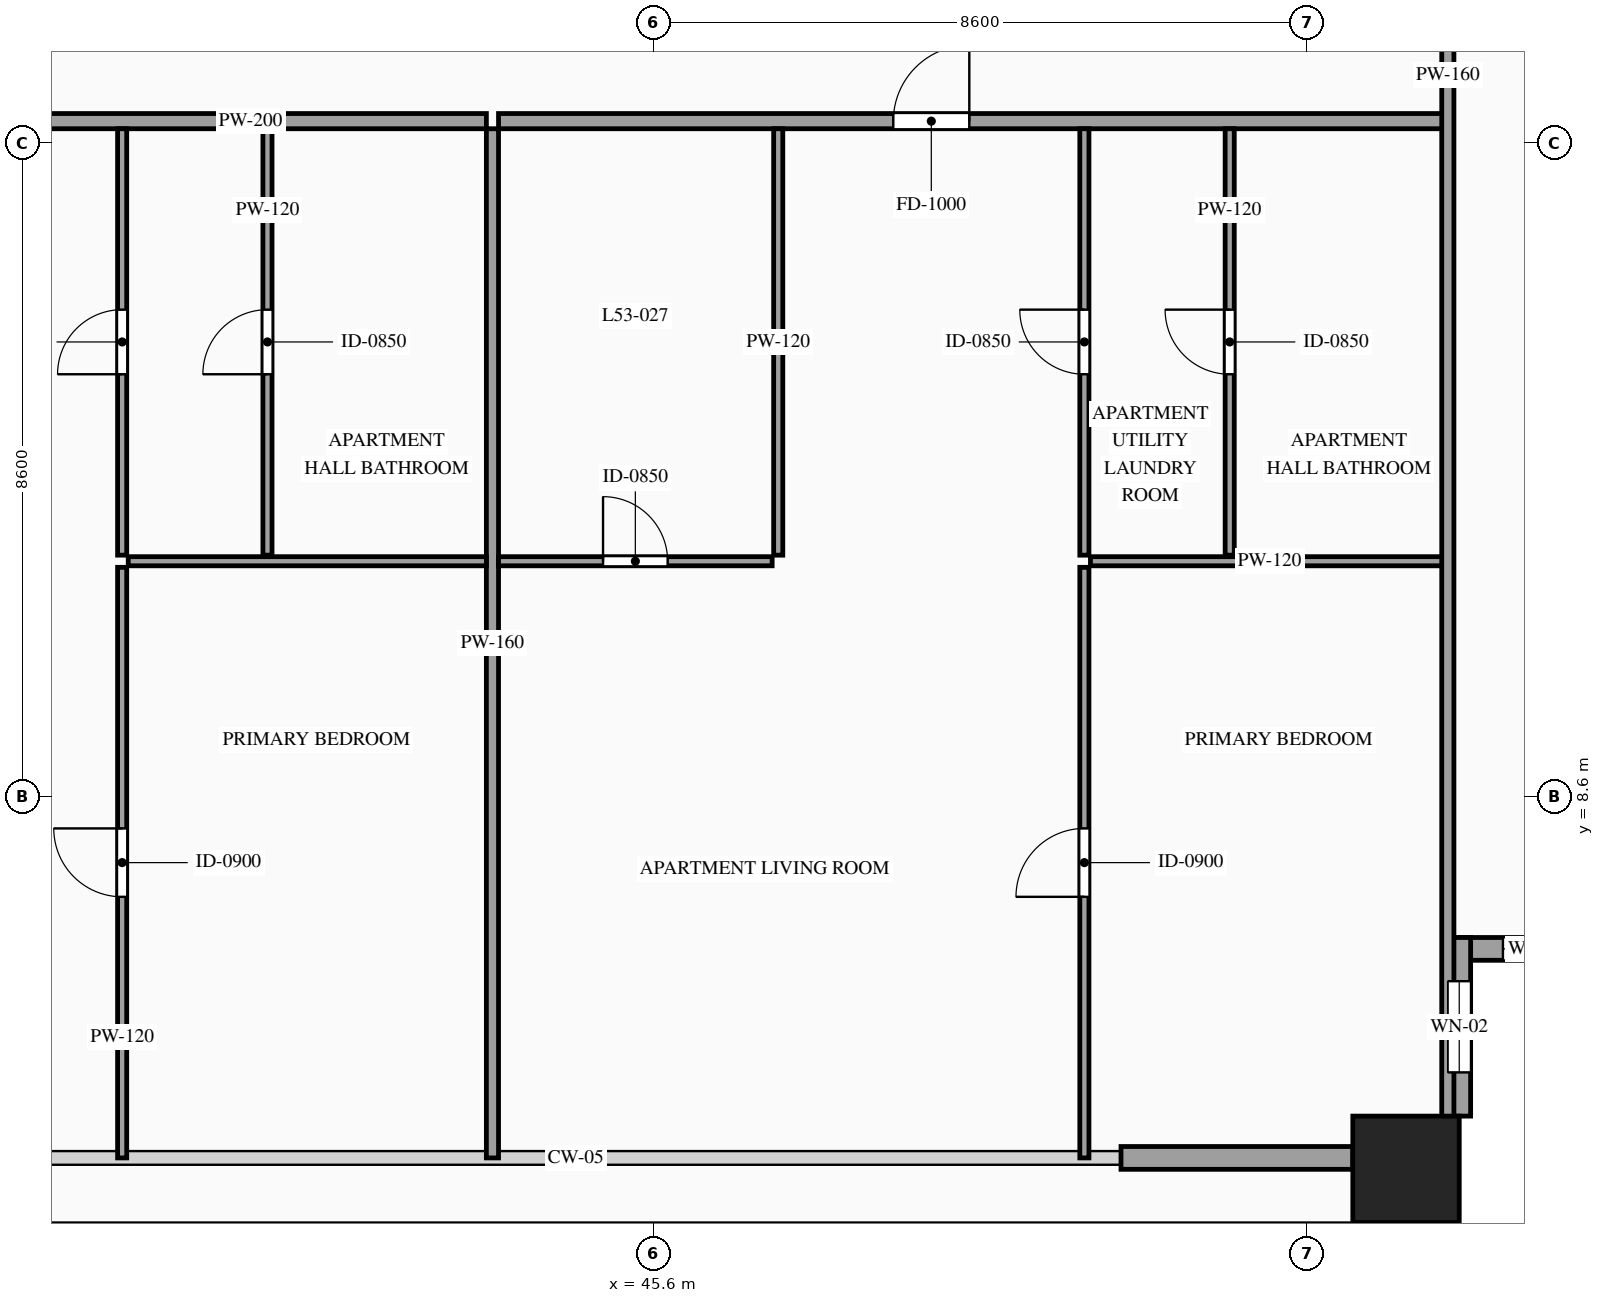
"""IFC4 building model, lengths in metres.
Left out: names, types, materials, properties, quantities, classifications, styles, units other than length and angle.
Written with IfcOpenShell. Run it as: python <this file> out.ifc"""

import sys

from ifc_helpers import new_model, si_unit, direction, frame, frame_2d, origin, origin_2d, place, context, subcontext, project, spatial, rectangle, hollow_rectangle, extrude, source, transform, mapped, element, fill, save


model = new_model("IFC4")
c1 = context("Model", 3, precision=1e-05, world=origin(), true_north=direction((0.0, 1.0)))
c2 = subcontext(c1, "Body", "Model", "MODEL_VIEW")
j1 = project(units=[si_unit("LENGTHUNIT", "METRE"), si_unit("PLANEANGLEUNIT", "RADIAN")], contexts=[c1])
p1 = place(None, origin())
s1 = spatial("IfcSite", under=j1, at=p1, CompositionType="ELEMENT")
p2 = place(p1, origin())
s2 = spatial("IfcBuilding", under=s1, at=p2, CompositionType="ELEMENT")
p3 = place(p2, frame((0.0, 0.0, 202.0)))
s3 = spatial("IfcBuildingStorey", under=s2, at=p3, CompositionType="ELEMENT", Elevation=202.0)
m1 = source(origin(), c2, "Body", "SweptSolid", [
    extrude(hollow_rectangle(XDim=1.4, YDim=1.4, WallThickness=0.06, at=origin_2d()), origin(), (0.0, 0.0, 1.0), 3.5),
])
p4 = place(p3, frame((55.5, 3.7, 0.0), z_axis=(0.0, 0.0, 1.0), x_axis=(1.0, 0.0, 0.0)))
e1 = element("IfcColumn", 1, at=p4, inside=s3, PredefinedType="COLUMN", context=c2, shape_type="MappedRepresentation", body=[
    mapped(m1, transform((0.0, 0.0, 0.0), scale=1.0)),
])
p5 = place(p3, frame((56.05, 6.6, 0.0), z_axis=(0.0, 0.0, 1.0), x_axis=(1.0, 0.0, 0.0)))
e2 = element("IfcWall", 2, at=p5, inside=s3, PredefinedType="SOLIDWALL", context=c2, shape_type="SweptSolid", body=[
    extrude(rectangle(XDim=2.35, YDim=0.3, at=frame_2d((1.175, 0.0))), origin(), (0.0, 0.0, 1.0), 3.28),
])
p6 = place(p5, frame((0.725, 0.0, 0.85)))
e3 = element("IfcOpeningElement", 3, at=p6, cuts=e2, PredefinedType="OPENING", context=c2, shape_type="SweptSolid", body=[
    extrude(rectangle(XDim=0.9, YDim=1.5, at=frame_2d((0.45, 0.75))), frame((0.0, 0.165, 0.0), z_axis=(0.0, -1.0, 0.0), x_axis=(1.0, 0.0, 0.0)), (0.0, 0.0, 1.0), 0.33),
])
p7 = place(p3, frame((56.2, 4.4, 0.0), z_axis=(0.0, 0.0, 1.0), x_axis=(0.0, 1.0, 0.0)))
e4 = element("IfcWall", 4, at=p7, inside=s3, PredefinedType="SOLIDWALL", context=c2, shape_type="SweptSolid", body=[
    extrude(rectangle(XDim=2.35, YDim=0.3, at=frame_2d((1.175, 0.0))), origin(), (0.0, 0.0, 1.0), 3.28),
])
p8 = place(p7, frame((0.575, 0.0, 0.85)))
e5 = element("IfcOpeningElement", 5, at=p8, cuts=e4, PredefinedType="OPENING", context=c2, shape_type="SweptSolid", body=[
    extrude(rectangle(XDim=1.2, YDim=2.1, at=frame_2d((0.6, 1.05))), frame((0.0, 0.165, 0.0), z_axis=(0.0, -1.0, 0.0), x_axis=(1.0, 0.0, 0.0)), (0.0, 0.0, 1.0), 0.33),
])
m2 = source(origin(), c2, "Body", "SweptSolid", [
    extrude(rectangle(XDim=3.05, YDim=0.3, at=frame_2d((1.525, 0.0))), origin(), (0.0, 0.0, 1.0), 2.835),
])
p9 = place(p3, frame((51.75, 3.85, 0.0), z_axis=(0.0, 0.0, 1.0), x_axis=(1.0, 0.0, 0.0)))
e6 = element("IfcWall", 6, at=p9, inside=s3, PredefinedType="SOLIDWALL", context=c2, shape_type="MappedRepresentation", body=[
    mapped(m2, transform((0.0, 0.0, 0.0), scale=1.0)),
])
p10 = place(p3, frame((30.6, 17.49, 0.0), z_axis=(0.0, 0.0, 1.0), x_axis=(1.0, 0.0, 0.0)))
e7 = element("IfcWall", 7, at=p10, inside=s3, PredefinedType="PARTITIONING", context=c2, shape_type="SweptSolid", body=[
    extrude(rectangle(XDim=12.8, YDim=0.2, at=frame_2d((6.4, 0.0))), origin(), (0.0, 0.0, 1.0), 3.28),
])
p11 = place(p10, frame((5.344, 0.0, 0.0)))
e8 = element("IfcOpeningElement", 8, at=p11, cuts=e7, PredefinedType="OPENING", context=c2, shape_type="SweptSolid", body=[
    extrude(rectangle(XDim=1.0, YDim=2.2, at=frame_2d((0.5, 1.1))), frame((0.0, 0.115, 0.0), z_axis=(0.0, -1.0, 0.0), x_axis=(1.0, 0.0, 0.0)), (0.0, 0.0, 1.0), 0.23),
])
m3 = source(origin(), c2, "Body", "SweptSolid", [
    extrude(rectangle(XDim=13.54, YDim=0.16, at=frame_2d((6.77, 0.0))), origin(), (0.0, 0.0, 1.0), 3.28),
])
p12 = place(p3, frame((43.48, 3.85, 0.0), z_axis=(0.0, 0.0, 1.0), x_axis=(0.0, 1.0, 0.0)))
e9 = element("IfcWall", 9, at=p12, inside=s3, PredefinedType="PARTITIONING", context=c2, shape_type="MappedRepresentation", body=[
    mapped(m3, transform((0.0, 0.0, 0.0), scale=1.0)),
])
p13 = place(p3, frame((40.52, 11.78, 0.0), z_axis=(0.0, 0.0, 1.0), x_axis=(0.0, 1.0, 0.0)))
e10 = element("IfcWall", 10, at=p13, inside=s3, PredefinedType="PARTITIONING", context=c2, shape_type="SweptSolid", body=[
    extrude(rectangle(XDim=5.61, YDim=0.12, at=frame_2d((2.805, 0.0))), origin(), (0.0, 0.0, 1.0), 3.28),
])
p14 = place(p13, frame((2.38, 0.0, 0.0)))
e11 = element("IfcOpeningElement", 11, at=p14, cuts=e10, PredefinedType="OPENING", context=c2, shape_type="SweptSolid", body=[
    extrude(rectangle(XDim=0.85, YDim=2.1, at=frame_2d((0.425, 1.05))), frame((0.0, 0.075, 0.0), z_axis=(0.0, -1.0, 0.0), x_axis=(1.0, 0.0, 0.0)), (0.0, 0.0, 1.0), 0.15),
])
m4 = source(origin(), c2, "Body", "SweptSolid", [
    extrude(rectangle(XDim=4.712, YDim=0.12, at=frame_2d((2.356, 0.0))), origin(), (0.0, 0.0, 1.0), 2.875),
])
p15 = place(p3, frame((38.688, 11.7, 0.0), z_axis=(0.0, 0.0, 1.0), x_axis=(1.0, 0.0, 0.0)))
e12 = element("IfcWall", 12, at=p15, inside=s3, PredefinedType="PARTITIONING", context=c2, shape_type="MappedRepresentation", body=[
    mapped(m4, transform((0.0, 0.0, 0.0), scale=1.0)),
])
p16 = place(p3, frame((38.608, 3.85, 0.0), z_axis=(0.0, 0.0, 1.0), x_axis=(0.0, 1.0, 0.0)))
e13 = element("IfcWall", 13, at=p16, inside=s3, PredefinedType="PARTITIONING", context=c2, shape_type="SweptSolid", body=[
    extrude(rectangle(XDim=7.77, YDim=0.12, at=frame_2d((3.885, 0.0))), origin(), (0.0, 0.0, 1.0), 3.28),
])
p17 = place(p16, frame((3.435, 0.0, 0.0)))
e14 = element("IfcOpeningElement", 14, at=p17, cuts=e13, PredefinedType="OPENING", context=c2, shape_type="SweptSolid", body=[
    extrude(rectangle(XDim=0.9, YDim=2.15, at=frame_2d((0.45, 1.075))), frame((0.0, 0.075, 0.0), z_axis=(0.0, -1.0, 0.0), x_axis=(1.0, 0.0, 0.0)), (0.0, 0.0, 1.0), 0.15),
])
p18 = place(p3, frame((38.608, 11.78, 0.0), z_axis=(0.0, 0.0, 1.0), x_axis=(0.0, 1.0, 0.0)))
e15 = element("IfcWall", 15, at=p18, inside=s3, PredefinedType="PARTITIONING", context=c2, shape_type="SweptSolid", body=[
    extrude(rectangle(XDim=5.61, YDim=0.12, at=frame_2d((2.805, 0.0))), origin(), (0.0, 0.0, 1.0), 3.28),
])
p19 = place(p18, frame((2.38, 0.0, 0.0)))
e16 = element("IfcOpeningElement", 16, at=p19, cuts=e15, PredefinedType="OPENING", context=c2, shape_type="SweptSolid", body=[
    extrude(rectangle(XDim=0.85, YDim=2.1, at=frame_2d((0.425, 1.05))), frame((0.0, 0.075, 0.0), z_axis=(0.0, -1.0, 0.0), x_axis=(1.0, 0.0, 0.0)), (0.0, 0.0, 1.0), 0.15),
])
p20 = place(p3, frame((43.56, 17.49, 0.0), z_axis=(0.0, 0.0, 1.0), x_axis=(1.0, 0.0, 0.0)))
e17 = element("IfcWall", 17, at=p20, inside=s3, PredefinedType="PARTITIONING", context=c2, shape_type="SweptSolid", body=[
    extrude(rectangle(XDim=12.5, YDim=0.2, at=frame_2d((6.25, 0.0))), origin(), (0.0, 0.0, 1.0), 3.28),
])
p21 = place(p20, frame((5.194, 0.0, 0.0)))
e18 = element("IfcOpeningElement", 18, at=p21, cuts=e17, PredefinedType="OPENING", context=c2, shape_type="SweptSolid", body=[
    extrude(rectangle(XDim=1.0, YDim=2.2, at=frame_2d((0.5, 1.1))), frame((0.0, 0.115, 0.0), z_axis=(0.0, -1.0, 0.0), x_axis=(1.0, 0.0, 0.0)), (0.0, 0.0, 1.0), 0.23),
])
p22 = place(p3, frame((43.56, 11.7, 0.0), z_axis=(0.0, 0.0, 1.0), x_axis=(1.0, 0.0, 0.0)))
e19 = element("IfcWall", 19, at=p22, inside=s3, PredefinedType="PARTITIONING", context=c2, shape_type="SweptSolid", body=[
    extrude(rectangle(XDim=3.6, YDim=0.12, at=frame_2d((1.8, 0.0))), origin(), (0.0, 0.0, 1.0), 2.875),
])
p23 = place(p22, frame((1.375, 0.0, 0.0)))
e20 = element("IfcOpeningElement", 20, at=p23, cuts=e19, PredefinedType="OPENING", context=c2, shape_type="SweptSolid", body=[
    extrude(rectangle(XDim=0.85, YDim=2.1, at=frame_2d((0.425, 1.05))), frame((0.0, 0.075, 0.0), z_axis=(0.0, -1.0, 0.0), x_axis=(1.0, 0.0, 0.0)), (0.0, 0.0, 1.0), 0.15),
])
m5 = source(origin(), c2, "Body", "SweptSolid", [
    extrude(rectangle(XDim=5.61, YDim=0.12, at=frame_2d((2.805, 0.0))), origin(), (0.0, 0.0, 1.0), 3.28),
])
p24 = place(p3, frame((47.24, 11.78, 0.0), z_axis=(0.0, 0.0, 1.0), x_axis=(0.0, 1.0, 0.0)))
e21 = element("IfcWall", 21, at=p24, inside=s3, PredefinedType="PARTITIONING", context=c2, shape_type="MappedRepresentation", body=[
    mapped(m5, transform((0.0, 0.0, 0.0), scale=1.0)),
])
p25 = place(p3, frame((53.18, 11.78, 0.0), z_axis=(0.0, 0.0, 1.0), x_axis=(0.0, 1.0, 0.0)))
e22 = element("IfcWall", 22, at=p25, inside=s3, PredefinedType="PARTITIONING", context=c2, shape_type="SweptSolid", body=[
    extrude(rectangle(XDim=5.61, YDim=0.12, at=frame_2d((2.805, 0.0))), origin(), (0.0, 0.0, 1.0), 3.28),
])
p26 = place(p25, frame((2.38, 0.0, 0.0)))
e23 = element("IfcOpeningElement", 23, at=p26, cuts=e22, PredefinedType="OPENING", context=c2, shape_type="SweptSolid", body=[
    extrude(rectangle(XDim=0.85, YDim=2.1, at=frame_2d((0.425, 1.05))), frame((0.0, 0.075, 0.0), z_axis=(0.0, -1.0, 0.0), x_axis=(1.0, 0.0, 0.0)), (0.0, 0.0, 1.0), 0.15),
])
m6 = source(origin(), c2, "Body", "SweptSolid", [
    extrude(rectangle(XDim=4.712, YDim=0.12, at=frame_2d((2.356, 0.0))), origin(), (0.0, 0.0, 1.0), 3.28),
])
p27 = place(p3, frame((51.348, 11.7, 0.0), z_axis=(0.0, 0.0, 1.0), x_axis=(1.0, 0.0, 0.0)))
e24 = element("IfcWall", 24, at=p27, inside=s3, PredefinedType="PARTITIONING", context=c2, shape_type="MappedRepresentation", body=[
    mapped(m6, transform((0.0, 0.0, 0.0), scale=1.0)),
])
p28 = place(p3, frame((51.268, 3.85, 0.0), z_axis=(0.0, 0.0, 1.0), x_axis=(0.0, 1.0, 0.0)))
e25 = element("IfcWall", 25, at=p28, inside=s3, PredefinedType="PARTITIONING", context=c2, shape_type="SweptSolid", body=[
    extrude(rectangle(XDim=7.77, YDim=0.12, at=frame_2d((3.885, 0.0))), origin(), (0.0, 0.0, 1.0), 3.28),
])
p29 = place(p28, frame((3.435, 0.0, 0.0)))
e26 = element("IfcOpeningElement", 26, at=p29, cuts=e25, PredefinedType="OPENING", context=c2, shape_type="SweptSolid", body=[
    extrude(rectangle(XDim=0.9, YDim=2.15, at=frame_2d((0.45, 1.075))), frame((0.0, 0.075, 0.0), z_axis=(0.0, -1.0, 0.0), x_axis=(1.0, 0.0, 0.0)), (0.0, 0.0, 1.0), 0.15),
])
p30 = place(p3, frame((51.268, 11.78, 0.0), z_axis=(0.0, 0.0, 1.0), x_axis=(0.0, 1.0, 0.0)))
e27 = element("IfcWall", 27, at=p30, inside=s3, PredefinedType="PARTITIONING", context=c2, shape_type="SweptSolid", body=[
    extrude(rectangle(XDim=5.61, YDim=0.12, at=frame_2d((2.805, 0.0))), origin(), (0.0, 0.0, 1.0), 3.28),
])
p31 = place(p30, frame((2.38, 0.0, 0.0)))
e28 = element("IfcOpeningElement", 28, at=p31, cuts=e27, PredefinedType="OPENING", context=c2, shape_type="SweptSolid", body=[
    extrude(rectangle(XDim=0.85, YDim=2.1, at=frame_2d((0.425, 1.05))), frame((0.0, 0.075, 0.0), z_axis=(0.0, -1.0, 0.0), x_axis=(1.0, 0.0, 0.0)), (0.0, 0.0, 1.0), 0.15),
])
m7 = source(origin(), c2, "Body", "SweptSolid", [
    extrude(rectangle(XDim=28.19, YDim=0.16, at=frame_2d((14.095, 0.0))), origin(), (0.0, 0.0, 1.0), 3.28),
])
p32 = place(p3, frame((56.05, 4.0, 0.0), z_axis=(0.0, 0.0, 1.0), x_axis=(0.0, 1.0, 0.0)))
e29 = element("IfcWall", 29, at=p32, inside=s3, PredefinedType="PARTITIONING", context=c2, shape_type="MappedRepresentation", body=[
    mapped(m7, transform((0.0, 0.0, 0.0), scale=1.0)),
])
m8 = source(origin(), c2, "Body", "SweptSolid", [
    extrude(rectangle(XDim=0.9, YDim=1.5, at=frame_2d((0.45, 0.75))), frame((0.0, 0.03, 0.0), z_axis=(0.0, -1.0, 0.0), x_axis=(1.0, 0.0, 0.0)), (0.0, 0.0, 1.0), 0.06),
])
p33 = place(p6, origin())
e30 = element("IfcWindow", 30, at=p33, inside=s3, PartitioningType="SINGLE_PANEL", PredefinedType="WINDOW", context=c2, shape_type="MappedRepresentation", body=[
    mapped(m8, transform((0.0, 0.0, 0.0), scale=1.0)),
])
fill(e3, e30)
m9 = source(origin(), c2, "Body", "SweptSolid", [
    extrude(rectangle(XDim=1.2, YDim=2.1, at=frame_2d((0.6, 1.05))), frame((0.0, 0.03, 0.0), z_axis=(0.0, -1.0, 0.0), x_axis=(1.0, 0.0, 0.0)), (0.0, 0.0, 1.0), 0.06),
])
p34 = place(p8, origin())
e31 = element("IfcWindow", 31, at=p34, inside=s3, PartitioningType="SINGLE_PANEL", PredefinedType="WINDOW", context=c2, shape_type="MappedRepresentation", body=[
    mapped(m9, transform((0.0, 0.0, 0.0), scale=1.0)),
])
fill(e5, e31)
m10 = source(origin(), c2, "Body", "SweptSolid", [
    extrude(rectangle(XDim=0.85, YDim=2.1, at=frame_2d((0.425, 1.05))), frame((0.0, 0.025, 0.0), z_axis=(0.0, -1.0, 0.0), x_axis=(1.0, 0.0, 0.0)), (0.0, 0.0, 1.0), 0.05),
])
p35 = place(p14, origin())
e32 = element("IfcDoor", 32, at=p35, inside=s3, OperationType="SINGLE_SWING_LEFT", PredefinedType="DOOR", context=c2, shape_type="MappedRepresentation", body=[
    mapped(m10, transform((0.0, 0.0, 0.0), scale=1.0)),
])
fill(e11, e32)
m11 = source(origin(), c2, "Body", "SweptSolid", [
    extrude(rectangle(XDim=0.9, YDim=2.15, at=frame_2d((0.45, 1.075))), frame((0.0, 0.025, 0.0), z_axis=(0.0, -1.0, 0.0), x_axis=(1.0, 0.0, 0.0)), (0.0, 0.0, 1.0), 0.05),
])
p36 = place(p17, origin())
e33 = element("IfcDoor", 33, at=p36, inside=s3, OperationType="SINGLE_SWING_RIGHT", PredefinedType="DOOR", context=c2, shape_type="MappedRepresentation", body=[
    mapped(m11, transform((0.0, 0.0, 0.0), scale=1.0)),
])
fill(e14, e33)
p37 = place(p19, origin())
e34 = element("IfcDoor", 34, at=p37, inside=s3, OperationType="SINGLE_SWING_LEFT", PredefinedType="DOOR", context=c2, shape_type="MappedRepresentation", body=[
    mapped(m10, transform((0.0, 0.0, 0.0), scale=1.0)),
])
fill(e16, e34)
m12 = source(origin(), c2, "Body", "SweptSolid", [
    extrude(rectangle(XDim=1.0, YDim=2.2, at=frame_2d((0.5, 1.1))), frame((0.0, 0.025, 0.0), z_axis=(0.0, -1.0, 0.0), x_axis=(1.0, 0.0, 0.0)), (0.0, 0.0, 1.0), 0.05),
])
p38 = place(p21, origin())
e35 = element("IfcDoor", 35, at=p38, inside=s3, OperationType="SINGLE_SWING_RIGHT", PredefinedType="DOOR", context=c2, shape_type="MappedRepresentation", body=[
    mapped(m12, transform((0.0, 0.0, 0.0), scale=1.0)),
])
fill(e18, e35)
p39 = place(p23, origin())
e36 = element("IfcDoor", 36, at=p39, inside=s3, OperationType="SINGLE_SWING_LEFT", PredefinedType="DOOR", context=c2, shape_type="MappedRepresentation", body=[
    mapped(m10, transform((0.0, 0.0, 0.0), scale=1.0)),
])
fill(e20, e36)
p40 = place(p26, origin())
e37 = element("IfcDoor", 37, at=p40, inside=s3, OperationType="SINGLE_SWING_RIGHT", PredefinedType="DOOR", context=c2, shape_type="MappedRepresentation", body=[
    mapped(m10, transform((0.0, 0.0, 0.0), scale=1.0)),
])
fill(e23, e37)
p41 = place(p29, origin())
e38 = element("IfcDoor", 38, at=p41, inside=s3, OperationType="SINGLE_SWING_LEFT", PredefinedType="DOOR", context=c2, shape_type="MappedRepresentation", body=[
    mapped(m11, transform((0.0, 0.0, 0.0), scale=1.0)),
])
fill(e26, e38)
p42 = place(p31, origin())
e39 = element("IfcDoor", 39, at=p42, inside=s3, OperationType="SINGLE_SWING_RIGHT", PredefinedType="DOOR", context=c2, shape_type="MappedRepresentation", body=[
    mapped(m10, transform((0.0, 0.0, 0.0), scale=1.0)),
])
fill(e28, e39)
save(model, sys.argv[1])
